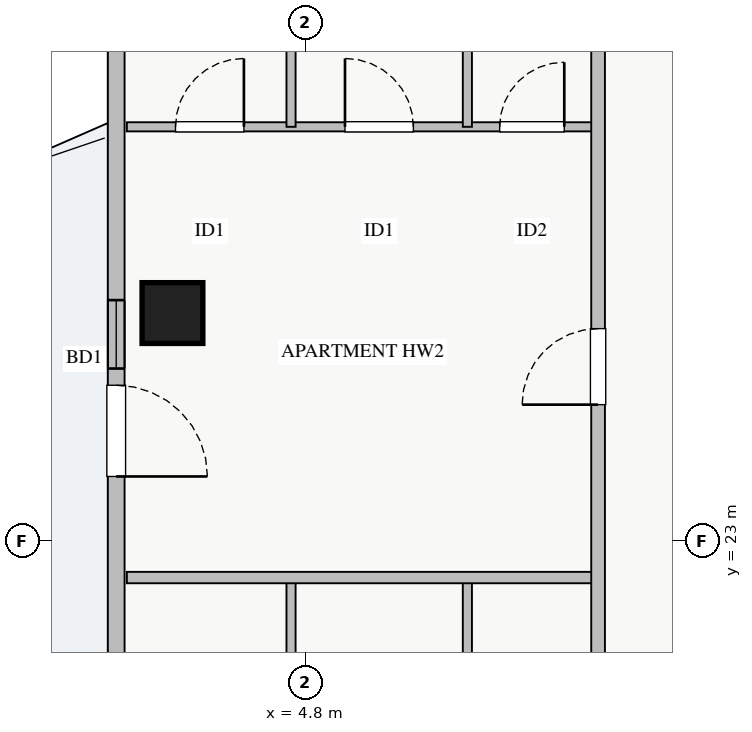
"""IFC4 building model, lengths in metres.
Left out: names, types, materials, properties, quantities, classifications, styles, units other than length and angle.
Written with IfcOpenShell. Run it as: python <this file> out.ifc"""

import sys

from ifc_helpers import new_model, si_unit, direction, frame, frame_2d, origin, origin_2d, place, context, subcontext, project, spatial, rectangle, extrude, source, transform, mapped, element, fill, save


model = new_model("IFC4")
c1 = context("Model", 3, precision=1e-05, world=origin(), true_north=direction((0.0, 1.0)))
c2 = subcontext(c1, "Body", "Model", "MODEL_VIEW")
j1 = project(units=[si_unit("LENGTHUNIT", "METRE"), si_unit("PLANEANGLEUNIT", "RADIAN")], contexts=[c1])
p1 = place(None, origin())
s1 = spatial("IfcSite", under=j1, at=p1, CompositionType="ELEMENT")
p2 = place(p1, origin())
s2 = spatial("IfcBuilding", under=s1, at=p2, CompositionType="ELEMENT")
p3 = place(p2, frame((0.0, 0.0, 197.0)))
s3 = spatial("IfcBuildingStorey", under=s2, at=p3, CompositionType="ELEMENT", Elevation=197.0)
m1 = source(origin(), c2, "Body", "SweptSolid", [
    extrude(rectangle(XDim=0.8, YDim=0.8, at=origin_2d()), origin(), (0.0, 0.0, 1.0), 3.25),
])
p4 = place(p3, frame((3.05, 26.0, 0.0), z_axis=(0.0, 0.0, 1.0), x_axis=(1.0, 0.0, 0.0)))
e1 = element("IfcColumn", 1, at=p4, inside=s3, PredefinedType="COLUMN", context=c2, shape_type="MappedRepresentation", body=[
    mapped(m1, transform((0.0, 0.0, 0.0), x_axis=(1.0, 0.0, 0.0), y_axis=(0.0, 1.0, 0.0), z_axis=(0.0, 0.0, 1.0), scale=1.0)),
])
p5 = place(p3, frame((2.31, 11.65, 0.0), z_axis=(0.0, 0.0, 1.0), x_axis=(0.0, 1.0, 0.0)))
e2 = element("IfcWall", 2, at=p5, inside=s3, PredefinedType="STANDARD", context=c2, shape_type="SweptSolid", body=[
    extrude(rectangle(XDim=22.7, YDim=0.22, at=frame_2d((11.35, 0.0))), origin(), (0.0, 0.0, 1.0), 2.61),
])
p6 = place(p5, frame((12.2, 0.0, 0.0)))
e3 = element("IfcOpeningElement", 3, at=p6, cuts=e2, PredefinedType="OPENING", context=c2, shape_type="SweptSolid", body=[
    extrude(rectangle(XDim=1.2, YDim=2.1, at=frame_2d((0.6, 1.05))), frame((0.0, 0.12, 0.0), z_axis=(0.0, -1.0, 0.0), x_axis=(1.0, 0.0, 0.0)), (0.0, 0.0, 1.0), 0.24),
])
p7 = place(p5, frame((1.638, 0.0, 0.9)))
e4 = element("IfcOpeningElement", 4, at=p7, cuts=e2, PredefinedType="OPENING", context=c2, shape_type="SweptSolid", body=[
    extrude(rectangle(XDim=2.4, YDim=1.48, at=frame_2d((1.2, 0.74))), frame((0.0, 0.12, 0.0), z_axis=(0.0, -1.0, 0.0), x_axis=(1.0, 0.0, 0.0)), (0.0, 0.0, 1.0), 0.24),
])
p8 = place(p5, frame((18.813, 0.0, 0.9)))
e5 = element("IfcOpeningElement", 5, at=p8, cuts=e2, PredefinedType="OPENING", context=c2, shape_type="SweptSolid", body=[
    extrude(rectangle(XDim=2.1, YDim=1.48, at=frame_2d((1.05, 0.74))), frame((0.0, 0.12, 0.0), z_axis=(0.0, -1.0, 0.0), x_axis=(1.0, 0.0, 0.0)), (0.0, 0.0, 1.0), 0.24),
])
p9 = place(p5, frame((5.16, 0.0, 0.9)))
e6 = element("IfcOpeningElement", 6, at=p9, cuts=e2, PredefinedType="OPENING", context=c2, shape_type="SweptSolid", body=[
    extrude(rectangle(XDim=0.9, YDim=1.2, at=frame_2d((0.45, 0.6))), frame((0.0, 0.12, 0.0), z_axis=(0.0, -1.0, 0.0), x_axis=(1.0, 0.0, 0.0)), (0.0, 0.0, 1.0), 0.24),
])
p10 = place(p5, frame((13.62, 0.0, 0.9)))
e7 = element("IfcOpeningElement", 7, at=p10, cuts=e2, PredefinedType="OPENING", context=c2, shape_type="SweptSolid", body=[
    extrude(rectangle(XDim=0.9, YDim=1.2, at=frame_2d((0.45, 0.6))), frame((0.0, 0.12, 0.0), z_axis=(0.0, -1.0, 0.0), x_axis=(1.0, 0.0, 0.0)), (0.0, 0.0, 1.0), 0.24),
])
for number, where, z_axis, x_axis in (
    (8, (4.61, 16.59, 0.0), (0.0, 0.0, 1.0), (0.0, 1.0, 0.0)),
    (9, (6.93, 16.59, 0.0), (0.0, 0.0, 1.0), (0.0, 1.0, 0.0)),
):
    element("IfcWall", number, at=place(p3, frame(where, z_axis=z_axis, x_axis=x_axis)), inside=s3, PredefinedType="PLUMBINGWALL", context=c2, shape_type="SweptSolid", body=[
        extrude(rectangle(XDim=5.93, YDim=0.12, at=frame_2d((2.965, 0.0))), origin(), (0.0, 0.0, 1.0), 3.07),
    ])
p11 = place(p3, frame((2.45, 28.45, 0.0), z_axis=(0.0, 0.0, 1.0), x_axis=(1.0, 0.0, 0.0)))
e10 = element("IfcWall", 10, at=p11, inside=s3, PredefinedType="PLUMBINGWALL", context=c2, shape_type="SweptSolid", body=[
    extrude(rectangle(XDim=6.2, YDim=0.12, at=frame_2d((3.1, 0.0))), origin(), (0.0, 0.0, 1.0), 3.07),
])
p12 = place(p11, frame((0.64, 0.0, 0.0)))
e11 = element("IfcOpeningElement", 11, at=p12, cuts=e10, PredefinedType="OPENING", context=c2, shape_type="SweptSolid", body=[
    extrude(rectangle(XDim=0.9, YDim=2.05, at=frame_2d((0.45, 1.025))), frame((0.0, 0.07, 0.0), z_axis=(0.0, -1.0, 0.0), x_axis=(1.0, 0.0, 0.0)), (0.0, 0.0, 1.0), 0.14),
])
p13 = place(p11, frame((2.87, 0.0, 0.0)))
e12 = element("IfcOpeningElement", 12, at=p13, cuts=e10, PredefinedType="OPENING", context=c2, shape_type="SweptSolid", body=[
    extrude(rectangle(XDim=0.9, YDim=2.05, at=frame_2d((0.45, 1.025))), frame((0.0, 0.07, 0.0), z_axis=(0.0, -1.0, 0.0), x_axis=(1.0, 0.0, 0.0)), (0.0, 0.0, 1.0), 0.14),
])
p14 = place(p11, frame((4.905, 0.0, 0.0)))
e13 = element("IfcOpeningElement", 13, at=p14, cuts=e10, PredefinedType="OPENING", context=c2, shape_type="SweptSolid", body=[
    extrude(rectangle(XDim=0.85, YDim=2.05, at=frame_2d((0.425, 1.025))), frame((0.0, 0.07, 0.0), z_axis=(0.0, -1.0, 0.0), x_axis=(1.0, 0.0, 0.0)), (0.0, 0.0, 1.0), 0.14),
])
for number, where, z_axis, x_axis in (
    (14, (4.61, 28.45, 0.0), (0.0, 0.0, 1.0), (0.0, 1.0, 0.0)),
    (15, (6.93, 28.45, 0.0), (0.0, 0.0, 1.0), (0.0, 1.0, 0.0)),
):
    element("IfcWall", number, at=place(p3, frame(where, z_axis=z_axis, x_axis=x_axis)), inside=s3, PredefinedType="PLUMBINGWALL", context=c2, shape_type="SweptSolid", body=[
        extrude(rectangle(XDim=6.43, YDim=0.12, at=frame_2d((3.215, 0.0))), origin(), (0.0, 0.0, 1.0), 3.07),
    ])
p15 = place(p3, frame((2.45, 22.52, 0.0), z_axis=(0.0, 0.0, 1.0), x_axis=(1.0, 0.0, 0.0)))
e16 = element("IfcWall", 16, at=p15, inside=s3, PredefinedType="PARTITIONING", context=c2, shape_type="SweptSolid", body=[
    extrude(rectangle(XDim=6.2, YDim=0.15, at=frame_2d((3.1, 0.0))), origin(), (0.0, 0.0, 1.0), 3.07),
])
p16 = place(p3, frame((8.65, 6.2, 0.0), z_axis=(0.0, 0.0, 1.0), x_axis=(0.0, 1.0, 0.0)))
e17 = element("IfcWall", 17, at=p16, inside=s3, PredefinedType="PARTITIONING", context=c2, shape_type="SweptSolid", body=[
    extrude(rectangle(XDim=33.6, YDim=0.18, at=frame_2d((16.8, 0.0))), origin(), (0.0, 0.0, 1.0), 3.07),
])
p17 = place(p16, frame((29.605, 0.0, 0.0)))
e18 = element("IfcOpeningElement", 18, at=p17, cuts=e17, PredefinedType="OPENING", context=c2, shape_type="SweptSolid", body=[
    extrude(rectangle(XDim=0.9, YDim=2.05, at=frame_2d((0.45, 1.025))), frame((0.0, 0.1, 0.0), z_axis=(0.0, -1.0, 0.0), x_axis=(1.0, 0.0, 0.0)), (0.0, 0.0, 1.0), 0.2),
])
p18 = place(p16, frame((2.92, 0.0, 0.0)))
e19 = element("IfcOpeningElement", 19, at=p18, cuts=e17, PredefinedType="OPENING", context=c2, shape_type="SweptSolid", body=[
    extrude(rectangle(XDim=0.9, YDim=2.05, at=frame_2d((0.45, 1.025))), frame((0.0, 0.1, 0.0), z_axis=(0.0, -1.0, 0.0), x_axis=(1.0, 0.0, 0.0)), (0.0, 0.0, 1.0), 0.2),
])
p19 = place(p16, frame((6.965, 0.0, 0.0)))
e20 = element("IfcOpeningElement", 20, at=p19, cuts=e17, PredefinedType="OPENING", context=c2, shape_type="SweptSolid", body=[
    extrude(rectangle(XDim=1.0, YDim=2.05, at=frame_2d((0.5, 1.025))), frame((0.0, 0.1, 0.0), z_axis=(0.0, -1.0, 0.0), x_axis=(1.0, 0.0, 0.0)), (0.0, 0.0, 1.0), 0.2),
])
p20 = place(p16, frame((18.595, 0.0, 0.0)))
e21 = element("IfcOpeningElement", 21, at=p20, cuts=e17, PredefinedType="OPENING", context=c2, shape_type="SweptSolid", body=[
    extrude(rectangle(XDim=1.0, YDim=2.05, at=frame_2d((0.5, 1.025))), frame((0.0, 0.1, 0.0), z_axis=(0.0, -1.0, 0.0), x_axis=(1.0, 0.0, 0.0)), (0.0, 0.0, 1.0), 0.2),
])
m2 = source(origin(), c2, "Body", "SweptSolid", [
    extrude(rectangle(XDim=1.2, YDim=2.1, at=frame_2d((0.6, 1.05))), frame((0.0, 0.025, 0.0), z_axis=(0.0, -1.0, 0.0), x_axis=(1.0, 0.0, 0.0)), (0.0, 0.0, 1.0), 0.05),
])
p21 = place(p6, frame((1.2, 0.0, 0.0), z_axis=(0.0, 0.0, 1.0), x_axis=(-1.0, 0.0, 0.0)))
e22 = element("IfcDoor", 22, at=p21, inside=s3, OperationType="SINGLE_SWING_LEFT", PredefinedType="DOOR", context=c2, shape_type="MappedRepresentation", body=[
    mapped(m2, transform((0.0, 0.0, 0.0), x_axis=(1.0, 0.0, 0.0), y_axis=(0.0, 1.0, 0.0), z_axis=(0.0, 0.0, 1.0), scale=1.0)),
])
fill(e3, e22)
m3 = source(origin(), c2, "Body", "SweptSolid", [
    extrude(rectangle(XDim=0.9, YDim=2.05, at=frame_2d((0.45, 1.025))), frame((0.0, 0.025, 0.0), z_axis=(0.0, -1.0, 0.0), x_axis=(1.0, 0.0, 0.0)), (0.0, 0.0, 1.0), 0.05),
])
p22 = place(p12, origin())
e23 = element("IfcDoor", 23, at=p22, inside=s3, OperationType="SINGLE_SWING_RIGHT", PredefinedType="DOOR", context=c2, shape_type="MappedRepresentation", body=[
    mapped(m3, transform((0.0, 0.0, 0.0), x_axis=(1.0, 0.0, 0.0), y_axis=(0.0, 1.0, 0.0), z_axis=(0.0, 0.0, 1.0), scale=1.0)),
])
fill(e11, e23)
p23 = place(p13, origin())
e24 = element("IfcDoor", 24, at=p23, inside=s3, OperationType="SINGLE_SWING_LEFT", PredefinedType="DOOR", context=c2, shape_type="MappedRepresentation", body=[
    mapped(m3, transform((0.0, 0.0, 0.0), x_axis=(1.0, 0.0, 0.0), y_axis=(0.0, 1.0, 0.0), z_axis=(0.0, 0.0, 1.0), scale=1.0)),
])
fill(e12, e24)
m4 = source(origin(), c2, "Body", "SweptSolid", [
    extrude(rectangle(XDim=0.85, YDim=2.05, at=frame_2d((0.425, 1.025))), frame((0.0, 0.025, 0.0), z_axis=(0.0, -1.0, 0.0), x_axis=(1.0, 0.0, 0.0)), (0.0, 0.0, 1.0), 0.05),
])
p24 = place(p14, origin())
e25 = element("IfcDoor", 25, at=p24, inside=s3, OperationType="SINGLE_SWING_RIGHT", PredefinedType="DOOR", context=c2, shape_type="MappedRepresentation", body=[
    mapped(m4, transform((0.0, 0.0, 0.0), x_axis=(1.0, 0.0, 0.0), y_axis=(0.0, 1.0, 0.0), z_axis=(0.0, 0.0, 1.0), scale=1.0)),
])
fill(e13, e25)
m5 = source(origin(), c2, "Body", "SweptSolid", [
    extrude(rectangle(XDim=1.0, YDim=2.05, at=frame_2d((0.5, 1.025))), frame((0.0, 0.025, 0.0), z_axis=(0.0, -1.0, 0.0), x_axis=(1.0, 0.0, 0.0)), (0.0, 0.0, 1.0), 0.05),
])
p25 = place(p20, origin())
e26 = element("IfcDoor", 26, at=p25, inside=s3, OperationType="SINGLE_SWING_LEFT", PredefinedType="DOOR", context=c2, shape_type="MappedRepresentation", body=[
    mapped(m5, transform((0.0, 0.0, 0.0), x_axis=(1.0, 0.0, 0.0), y_axis=(0.0, 1.0, 0.0), z_axis=(0.0, 0.0, 1.0), scale=1.0)),
])
fill(e21, e26)
m6 = source(origin(), c2, "Body", "SweptSolid", [
    extrude(rectangle(XDim=0.9, YDim=1.2, at=frame_2d((0.45, 0.6))), frame((0.0, 0.03, 0.0), z_axis=(0.0, -1.0, 0.0), x_axis=(1.0, 0.0, 0.0)), (0.0, 0.0, 1.0), 0.06),
])
p26 = place(p10, origin())
e27 = element("IfcWindow", 27, at=p26, inside=s3, PartitioningType="SINGLE_PANEL", PredefinedType="WINDOW", context=c2, shape_type="MappedRepresentation", body=[
    mapped(m6, transform((0.0, 0.0, 0.0), x_axis=(1.0, 0.0, 0.0), y_axis=(0.0, 1.0, 0.0), z_axis=(0.0, 0.0, 1.0), scale=1.0)),
])
fill(e7, e27)
save(model, sys.argv[1])
